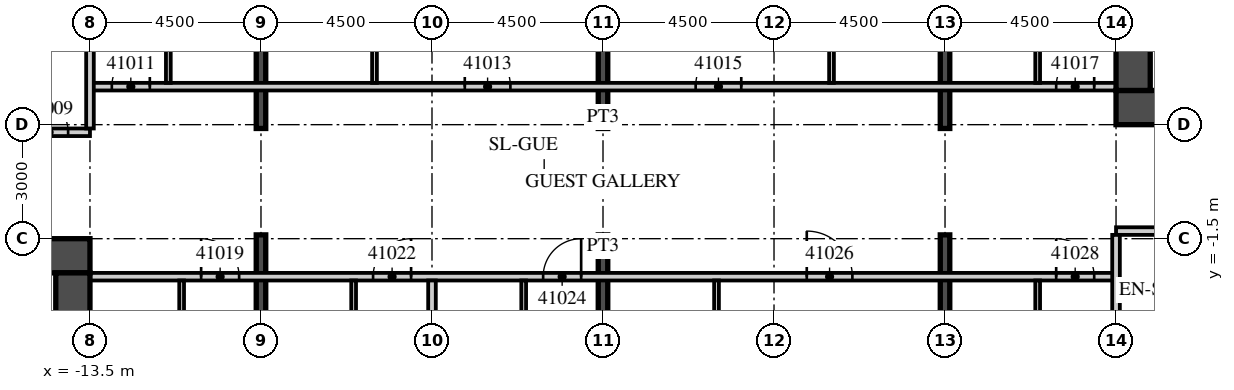
"""IFC4 building model, lengths in metres.
Left out: names, types, materials, properties, quantities, classifications, styles, units other than length and angle.
Written with IfcOpenShell. Run it as: python <this file> out.ifc"""

import sys

from ifc_helpers import new_model, si_unit, direction, frame, frame_2d, origin, place, context, subcontext, project, spatial, rectangle, extrude, element, fill, save


model = new_model("IFC4")
c1 = context("Model", 3, precision=1e-05, world=origin(), true_north=direction((0.0, 1.0)))
c2 = subcontext(c1, "Body", "Model", "MODEL_VIEW")
j1 = project(units=[si_unit("LENGTHUNIT", "METRE"), si_unit("PLANEANGLEUNIT", "RADIAN")], contexts=[c1])
p1 = place(None, origin())
s1 = spatial("IfcSite", under=j1, at=p1, CompositionType="ELEMENT")
p2 = place(p1, origin())
s2 = spatial("IfcBuilding", under=s1, at=p2, CompositionType="ELEMENT")
p3 = place(p2, frame((0.0, 0.0, 176.8)))
s3 = spatial("IfcBuildingStorey", under=s2, at=p3, CompositionType="ELEMENT", Elevation=176.8)
p4 = place(p3, frame((-9.0, -21.845, 0.0), z_axis=(0.0, 0.0, 1.0), x_axis=(0.0, 1.0, 0.0)))
e1 = element("IfcWall", 1, at=p4, inside=s3, PredefinedType="SHEAR", context=c2, shape_type="SweptSolid", body=[
    extrude(rectangle(XDim=20.445, YDim=0.25, at=frame_2d((10.223, 0.0))), origin(), (0.0, 0.0, 1.0), 3.3),
])
p5 = place(p3, frame((-9.0, 1.4, 0.0), z_axis=(0.0, 0.0, 1.0), x_axis=(0.0, 1.0, 0.0)))
e2 = element("IfcWall", 2, at=p5, inside=s3, PredefinedType="SHEAR", context=c2, shape_type="SweptSolid", body=[
    extrude(rectangle(XDim=18.001, YDim=0.25, at=frame_2d((9.0, 0.0))), origin(), (0.0, 0.0, 1.0), 3.3),
])
p6 = place(p3, frame((0.0, -20.979, 0.0), z_axis=(0.0, 0.0, 1.0), x_axis=(0.0, 1.0, 0.0)))
e3 = element("IfcWall", 3, at=p6, inside=s3, PredefinedType="SHEAR", context=c2, shape_type="SweptSolid", body=[
    extrude(rectangle(XDim=19.579, YDim=0.25, at=frame_2d((9.789, 0.0))), origin(), (0.0, 0.0, 1.0), 3.3),
])
p7 = place(p3, frame((0.0, 1.4, 0.0), z_axis=(0.0, 0.0, 1.0), x_axis=(0.0, 1.0, 0.0)))
e4 = element("IfcWall", 4, at=p7, inside=s3, PredefinedType="SHEAR", context=c2, shape_type="SweptSolid", body=[
    extrude(rectangle(XDim=18.867, YDim=0.25, at=frame_2d((9.434, 0.0))), origin(), (0.0, 0.0, 1.0), 3.3),
])
p8 = place(p3, frame((9.0, -20.112, 0.0), z_axis=(0.0, 0.0, 1.0), x_axis=(0.0, 1.0, 0.0)))
e5 = element("IfcWall", 5, at=p8, inside=s3, PredefinedType="SHEAR", context=c2, shape_type="SweptSolid", body=[
    extrude(rectangle(XDim=18.712, YDim=0.25, at=frame_2d((9.356, 0.0))), origin(), (0.0, 0.0, 1.0), 3.3),
])
p9 = place(p3, frame((9.0, 1.4, 0.0), z_axis=(0.0, 0.0, 1.0), x_axis=(0.0, 1.0, 0.0)))
e6 = element("IfcWall", 6, at=p9, inside=s3, PredefinedType="SHEAR", context=c2, shape_type="SweptSolid", body=[
    extrude(rectangle(XDim=19.734, YDim=0.25, at=frame_2d((9.867, 0.0))), origin(), (0.0, 0.0, 1.0), 3.3),
])
p10 = place(p3, frame((-42.913, 1.3, 0.0), z_axis=(0.0, 0.0, 1.0), x_axis=(1.0, 0.0, 0.0)))
e7 = element("IfcWall", 7, at=p10, inside=s3, PredefinedType="PARTITIONING", context=c2, shape_type="SweptSolid", body=[
    extrude(rectangle(XDim=29.413, YDim=0.2, at=frame_2d((14.707, 0.0))), origin(), (0.0, 0.0, 1.0), 3.02),
])
p11 = place(p10, frame((1.406, 0.0, 0.0)))
e8 = element("IfcOpeningElement", 8, at=p11, cuts=e7, PredefinedType="OPENING", context=c2, shape_type="SweptSolid", body=[
    extrude(rectangle(XDim=1.2, YDim=2.1, at=frame_2d((0.6, 1.05))), frame((0.0, 0.11, 0.0), z_axis=(0.0, -1.0, 0.0), x_axis=(1.0, 0.0, 0.0)), (0.0, 0.0, 1.0), 0.22),
])
p12 = place(p10, frame((12.275, 0.0, 0.0)))
e9 = element("IfcOpeningElement", 9, at=p12, cuts=e7, PredefinedType="OPENING", context=c2, shape_type="SweptSolid", body=[
    extrude(rectangle(XDim=1.2, YDim=2.1, at=frame_2d((0.6, 1.05))), frame((0.0, 0.11, 0.0), z_axis=(0.0, -1.0, 0.0), x_axis=(1.0, 0.0, 0.0)), (0.0, 0.0, 1.0), 0.22),
])
p13 = place(p10, frame((18.863, 0.0, 0.0)))
e10 = element("IfcOpeningElement", 10, at=p13, cuts=e7, PredefinedType="OPENING", context=c2, shape_type="SweptSolid", body=[
    extrude(rectangle(XDim=1.0, YDim=2.1, at=frame_2d((0.5, 1.05))), frame((0.0, 0.11, 0.0), z_axis=(0.0, -1.0, 0.0), x_axis=(1.0, 0.0, 0.0)), (0.0, 0.0, 1.0), 0.22),
])
p14 = place(p10, frame((23.338, 0.0, 0.0)))
e11 = element("IfcOpeningElement", 11, at=p14, cuts=e7, PredefinedType="OPENING", context=c2, shape_type="SweptSolid", body=[
    extrude(rectangle(XDim=1.0, YDim=2.1, at=frame_2d((0.5, 1.05))), frame((0.0, 0.11, 0.0), z_axis=(0.0, -1.0, 0.0), x_axis=(1.0, 0.0, 0.0)), (0.0, 0.0, 1.0), 0.22),
])
p15 = place(p10, frame((27.838, 0.0, 0.0)))
e12 = element("IfcOpeningElement", 12, at=p15, cuts=e7, PredefinedType="OPENING", context=c2, shape_type="SweptSolid", body=[
    extrude(rectangle(XDim=1.0, YDim=2.1, at=frame_2d((0.5, 1.05))), frame((0.0, 0.11, 0.0), z_axis=(0.0, -1.0, 0.0), x_axis=(1.0, 0.0, 0.0)), (0.0, 0.0, 1.0), 0.22),
])
p16 = place(p3, frame((-13.5, 2.5, 0.0), z_axis=(0.0, 0.0, 1.0), x_axis=(1.0, 0.0, 0.0)))
e13 = element("IfcWall", 13, at=p16, inside=s3, PredefinedType="PARTITIONING", context=c2, shape_type="SweptSolid", body=[
    extrude(rectangle(XDim=27.0, YDim=0.2, at=frame_2d((13.5, 0.0))), origin(), (0.0, 0.0, 1.0), 3.02),
])
p17 = place(p16, frame((0.575, 0.0, 0.0)))
e14 = element("IfcOpeningElement", 14, at=p17, cuts=e13, PredefinedType="OPENING", context=c2, shape_type="SweptSolid", body=[
    extrude(rectangle(XDim=1.0, YDim=2.1, at=frame_2d((0.5, 1.05))), frame((0.0, 0.11, 0.0), z_axis=(0.0, -1.0, 0.0), x_axis=(1.0, 0.0, 0.0)), (0.0, 0.0, 1.0), 0.22),
])
p18 = place(p16, frame((9.863, 0.0, 0.0)))
e15 = element("IfcOpeningElement", 15, at=p18, cuts=e13, PredefinedType="OPENING", context=c2, shape_type="SweptSolid", body=[
    extrude(rectangle(XDim=1.2, YDim=2.1, at=frame_2d((0.6, 1.05))), frame((0.0, 0.11, 0.0), z_axis=(0.0, -1.0, 0.0), x_axis=(1.0, 0.0, 0.0)), (0.0, 0.0, 1.0), 0.22),
])
p19 = place(p16, frame((15.938, 0.0, 0.0)))
e16 = element("IfcOpeningElement", 16, at=p19, cuts=e13, PredefinedType="OPENING", context=c2, shape_type="SweptSolid", body=[
    extrude(rectangle(XDim=1.2, YDim=2.1, at=frame_2d((0.6, 1.05))), frame((0.0, 0.11, 0.0), z_axis=(0.0, -1.0, 0.0), x_axis=(1.0, 0.0, 0.0)), (0.0, 0.0, 1.0), 0.22),
])
p20 = place(p16, frame((25.425, 0.0, 0.0)))
e17 = element("IfcOpeningElement", 17, at=p20, cuts=e13, PredefinedType="OPENING", context=c2, shape_type="SweptSolid", body=[
    extrude(rectangle(XDim=1.0, YDim=2.1, at=frame_2d((0.5, 1.05))), frame((0.0, 0.11, 0.0), z_axis=(0.0, -1.0, 0.0), x_axis=(1.0, 0.0, 0.0)), (0.0, 0.0, 1.0), 0.22),
])
p21 = place(p3, frame((-13.5, 1.4, 0.0), z_axis=(0.0, 0.0, 1.0), x_axis=(0.0, 1.0, 0.0)))
e18 = element("IfcWall", 18, at=p21, inside=s3, PredefinedType="PARTITIONING", context=c2, shape_type="SweptSolid", body=[
    extrude(rectangle(XDim=17.59, YDim=0.2, at=frame_2d((8.795, 0.0))), origin(), (0.0, 0.0, 1.0), 3.02),
])
p22 = place(p3, frame((-11.438, 2.6, 0.0), z_axis=(0.0, 0.0, 1.0), x_axis=(0.0, 1.0, 0.0)))
e19 = element("IfcWall", 19, at=p22, inside=s3, PredefinedType="PARTITIONING", context=c2, shape_type="SweptSolid", body=[
    extrude(rectangle(XDim=5.225, YDim=0.125, at=frame_2d((2.612, 0.0))), origin(), (0.0, 0.0, 1.0), 3.02),
])
p23 = place(p22, frame((2.45, 0.0, 0.0)))
e20 = element("IfcOpeningElement", 20, at=p23, cuts=e19, PredefinedType="OPENING", context=c2, shape_type="SweptSolid", body=[
    extrude(rectangle(XDim=0.9, YDim=2.1, at=frame_2d((0.45, 1.05))), frame((0.0, 0.073, 0.0), z_axis=(0.0, -1.0, 0.0), x_axis=(1.0, 0.0, 0.0)), (0.0, 0.0, 1.0), 0.145),
])
p24 = place(p3, frame((-6.013, 2.6, 0.0), z_axis=(0.0, 0.0, 1.0), x_axis=(0.0, 1.0, 0.0)))
e21 = element("IfcWall", 21, at=p24, inside=s3, PredefinedType="PARTITIONING", context=c2, shape_type="SweptSolid", body=[
    extrude(rectangle(XDim=5.225, YDim=0.125, at=frame_2d((2.612, 0.0))), origin(), (0.0, 0.0, 1.0), 3.02),
])
p25 = place(p24, frame((2.45, 0.0, 0.0)))
e22 = element("IfcOpeningElement", 22, at=p25, cuts=e21, PredefinedType="OPENING", context=c2, shape_type="SweptSolid", body=[
    extrude(rectangle(XDim=0.9, YDim=2.1, at=frame_2d((0.45, 1.05))), frame((0.0, 0.073, 0.0), z_axis=(0.0, -1.0, 0.0), x_axis=(1.0, 0.0, 0.0)), (0.0, 0.0, 1.0), 0.145),
])
p26 = place(p3, frame((6.013, 2.6, 0.0), z_axis=(0.0, 0.0, 1.0), x_axis=(0.0, 1.0, 0.0)))
e23 = element("IfcWall", 23, at=p26, inside=s3, PredefinedType="PARTITIONING", context=c2, shape_type="SweptSolid", body=[
    extrude(rectangle(XDim=5.225, YDim=0.125, at=frame_2d((2.612, 0.0))), origin(), (0.0, 0.0, 1.0), 3.02),
])
p27 = place(p26, frame((2.45, 0.0, 0.0)))
e24 = element("IfcOpeningElement", 24, at=p27, cuts=e23, PredefinedType="OPENING", context=c2, shape_type="SweptSolid", body=[
    extrude(rectangle(XDim=0.9, YDim=2.1, at=frame_2d((0.45, 1.05))), frame((0.0, 0.073, 0.0), z_axis=(0.0, -1.0, 0.0), x_axis=(1.0, 0.0, 0.0)), (0.0, 0.0, 1.0), 0.145),
])
p28 = place(p3, frame((11.438, 2.6, 0.0), z_axis=(0.0, 0.0, 1.0), x_axis=(0.0, 1.0, 0.0)))
e25 = element("IfcWall", 25, at=p28, inside=s3, PredefinedType="PARTITIONING", context=c2, shape_type="SweptSolid", body=[
    extrude(rectangle(XDim=5.225, YDim=0.125, at=frame_2d((2.612, 0.0))), origin(), (0.0, 0.0, 1.0), 3.02),
])
p29 = place(p28, frame((2.45, 0.0, 0.0)))
e26 = element("IfcOpeningElement", 26, at=p29, cuts=e25, PredefinedType="OPENING", context=c2, shape_type="SweptSolid", body=[
    extrude(rectangle(XDim=0.9, YDim=2.1, at=frame_2d((0.45, 1.05))), frame((0.0, 0.073, 0.0), z_axis=(0.0, -1.0, 0.0), x_axis=(1.0, 0.0, 0.0)), (0.0, 0.0, 1.0), 0.145),
])
p30 = place(p3, frame((-13.5, -2.5, 0.0), z_axis=(0.0, 0.0, 1.0), x_axis=(1.0, 0.0, 0.0)))
e27 = element("IfcWall", 27, at=p30, inside=s3, PredefinedType="PARTITIONING", context=c2, shape_type="SweptSolid", body=[
    extrude(rectangle(XDim=27.0, YDim=0.2, at=frame_2d((13.5, 0.0))), origin(), (0.0, 0.0, 1.0), 3.02),
])
p31 = place(p30, frame((2.925, 0.0, 0.0)))
e28 = element("IfcOpeningElement", 28, at=p31, cuts=e27, PredefinedType="OPENING", context=c2, shape_type="SweptSolid", body=[
    extrude(rectangle(XDim=1.0, YDim=2.1, at=frame_2d((0.5, 1.05))), frame((0.0, 0.11, 0.0), z_axis=(0.0, -1.0, 0.0), x_axis=(1.0, 0.0, 0.0)), (0.0, 0.0, 1.0), 0.22),
])
p32 = place(p30, frame((7.45, 0.0, 0.0)))
e29 = element("IfcOpeningElement", 29, at=p32, cuts=e27, PredefinedType="OPENING", context=c2, shape_type="SweptSolid", body=[
    extrude(rectangle(XDim=1.0, YDim=2.1, at=frame_2d((0.5, 1.05))), frame((0.0, 0.11, 0.0), z_axis=(0.0, -1.0, 0.0), x_axis=(1.0, 0.0, 0.0)), (0.0, 0.0, 1.0), 0.22),
])
p33 = place(p30, frame((11.925, 0.0, 0.0)))
e30 = element("IfcOpeningElement", 30, at=p33, cuts=e27, PredefinedType="OPENING", context=c2, shape_type="SweptSolid", body=[
    extrude(rectangle(XDim=1.0, YDim=2.1, at=frame_2d((0.5, 1.05))), frame((0.0, 0.11, 0.0), z_axis=(0.0, -1.0, 0.0), x_axis=(1.0, 0.0, 0.0)), (0.0, 0.0, 1.0), 0.22),
])
p34 = place(p30, frame((18.862, 0.0, 0.0)))
e31 = element("IfcOpeningElement", 31, at=p34, cuts=e27, PredefinedType="OPENING", context=c2, shape_type="SweptSolid", body=[
    extrude(rectangle(XDim=1.2, YDim=2.1, at=frame_2d((0.6, 1.05))), frame((0.0, 0.11, 0.0), z_axis=(0.0, -1.0, 0.0), x_axis=(1.0, 0.0, 0.0)), (0.0, 0.0, 1.0), 0.22),
])
p35 = place(p30, frame((25.425, 0.0, 0.0)))
e32 = element("IfcOpeningElement", 32, at=p35, cuts=e27, PredefinedType="OPENING", context=c2, shape_type="SweptSolid", body=[
    extrude(rectangle(XDim=1.0, YDim=2.1, at=frame_2d((0.5, 1.05))), frame((0.0, 0.11, 0.0), z_axis=(0.0, -1.0, 0.0), x_axis=(1.0, 0.0, 0.0)), (0.0, 0.0, 1.0), 0.22),
])
p36 = place(p3, frame((13.5, -1.3, 0.0), z_axis=(0.0, 0.0, 1.0), x_axis=(1.0, 0.0, 0.0)))
e33 = element("IfcWall", 33, at=p36, inside=s3, PredefinedType="PARTITIONING", context=c2, shape_type="SweptSolid", body=[
    extrude(rectangle(XDim=26.317, YDim=0.2, at=frame_2d((13.158, 0.0))), origin(), (0.0, 0.0, 1.0), 3.02),
])
p37 = place(p36, frame((2.925, 0.0, 0.0)))
e34 = element("IfcOpeningElement", 34, at=p37, cuts=e33, PredefinedType="OPENING", context=c2, shape_type="SweptSolid", body=[
    extrude(rectangle(XDim=1.0, YDim=2.1, at=frame_2d((0.5, 1.05))), frame((0.0, 0.11, 0.0), z_axis=(0.0, -1.0, 0.0), x_axis=(1.0, 0.0, 0.0)), (0.0, 0.0, 1.0), 0.22),
])
p38 = place(p36, frame((9.862, 0.0, 0.0)))
e35 = element("IfcOpeningElement", 35, at=p38, cuts=e33, PredefinedType="OPENING", context=c2, shape_type="SweptSolid", body=[
    extrude(rectangle(XDim=1.2, YDim=2.1, at=frame_2d((0.6, 1.05))), frame((0.0, 0.11, 0.0), z_axis=(0.0, -1.0, 0.0), x_axis=(1.0, 0.0, 0.0)), (0.0, 0.0, 1.0), 0.22),
])
p39 = place(p36, frame((15.938, 0.0, 0.0)))
e36 = element("IfcOpeningElement", 36, at=p39, cuts=e33, PredefinedType="OPENING", context=c2, shape_type="SweptSolid", body=[
    extrude(rectangle(XDim=1.2, YDim=2.1, at=frame_2d((0.6, 1.05))), frame((0.0, 0.11, 0.0), z_axis=(0.0, -1.0, 0.0), x_axis=(1.0, 0.0, 0.0)), (0.0, 0.0, 1.0), 0.22),
])
p40 = place(p36, frame((25.208, 0.0, 0.0)))
e37 = element("IfcOpeningElement", 37, at=p40, cuts=e33, PredefinedType="OPENING", context=c2, shape_type="SweptSolid", body=[
    extrude(rectangle(XDim=0.9, YDim=2.1, at=frame_2d((0.45, 1.05))), frame((0.0, 0.11, 0.0), z_axis=(0.0, -1.0, 0.0), x_axis=(1.0, 0.0, 0.0)), (0.0, 0.0, 1.0), 0.22),
])
p41 = place(p3, frame((-11.088, -7.825, 0.0), z_axis=(0.0, 0.0, 1.0), x_axis=(0.0, 1.0, 0.0)))
e38 = element("IfcWall", 38, at=p41, inside=s3, PredefinedType="PARTITIONING", context=c2, shape_type="SweptSolid", body=[
    extrude(rectangle(XDim=5.225, YDim=0.125, at=frame_2d((2.612, 0.0))), origin(), (0.0, 0.0, 1.0), 3.02),
])
p42 = place(p41, frame((1.875, 0.0, 0.0)))
e39 = element("IfcOpeningElement", 39, at=p42, cuts=e38, PredefinedType="OPENING", context=c2, shape_type="SweptSolid", body=[
    extrude(rectangle(XDim=0.9, YDim=2.1, at=frame_2d((0.45, 1.05))), frame((0.0, 0.073, 0.0), z_axis=(0.0, -1.0, 0.0), x_axis=(1.0, 0.0, 0.0)), (0.0, 0.0, 1.0), 0.145),
])
p43 = place(p3, frame((-4.5, -21.434, 0.0), z_axis=(0.0, 0.0, 1.0), x_axis=(0.0, 1.0, 0.0)))
e40 = element("IfcWall", 40, at=p43, inside=s3, PredefinedType="PARTITIONING", context=c2, shape_type="SweptSolid", body=[
    extrude(rectangle(XDim=18.834, YDim=0.2, at=frame_2d((9.417, 0.0))), origin(), (0.0, 0.0, 1.0), 3.02),
])
p44 = place(p3, frame((-6.562, -7.825, 0.0), z_axis=(0.0, 0.0, 1.0), x_axis=(0.0, 1.0, 0.0)))
e41 = element("IfcWall", 41, at=p44, inside=s3, PredefinedType="PARTITIONING", context=c2, shape_type="SweptSolid", body=[
    extrude(rectangle(XDim=5.225, YDim=0.125, at=frame_2d((2.612, 0.0))), origin(), (0.0, 0.0, 1.0), 3.02),
])
p45 = place(p44, frame((1.875, 0.0, 0.0)))
e42 = element("IfcOpeningElement", 42, at=p45, cuts=e41, PredefinedType="OPENING", context=c2, shape_type="SweptSolid", body=[
    extrude(rectangle(XDim=0.9, YDim=2.1, at=frame_2d((0.45, 1.05))), frame((0.0, 0.073, 0.0), z_axis=(0.0, -1.0, 0.0), x_axis=(1.0, 0.0, 0.0)), (0.0, 0.0, 1.0), 0.145),
])
p46 = place(p3, frame((-2.087, -7.825, 0.0), z_axis=(0.0, 0.0, 1.0), x_axis=(0.0, 1.0, 0.0)))
e43 = element("IfcWall", 43, at=p46, inside=s3, PredefinedType="PARTITIONING", context=c2, shape_type="SweptSolid", body=[
    extrude(rectangle(XDim=5.225, YDim=0.125, at=frame_2d((2.612, 0.0))), origin(), (0.0, 0.0, 1.0), 3.02),
])
p47 = place(p46, frame((1.875, 0.0, 0.0)))
e44 = element("IfcOpeningElement", 44, at=p47, cuts=e43, PredefinedType="OPENING", context=c2, shape_type="SweptSolid", body=[
    extrude(rectangle(XDim=0.9, YDim=2.1, at=frame_2d((0.45, 1.05))), frame((0.0, 0.073, 0.0), z_axis=(0.0, -1.0, 0.0), x_axis=(1.0, 0.0, 0.0)), (0.0, 0.0, 1.0), 0.145),
])
p48 = place(p3, frame((2.987, -7.825, 0.0), z_axis=(0.0, 0.0, 1.0), x_axis=(0.0, 1.0, 0.0)))
e45 = element("IfcWall", 45, at=p48, inside=s3, PredefinedType="PARTITIONING", context=c2, shape_type="SweptSolid", body=[
    extrude(rectangle(XDim=5.225, YDim=0.125, at=frame_2d((2.612, 0.0))), origin(), (0.0, 0.0, 1.0), 3.02),
])
p49 = place(p48, frame((1.875, 0.0, 0.0)))
e46 = element("IfcOpeningElement", 46, at=p49, cuts=e45, PredefinedType="OPENING", context=c2, shape_type="SweptSolid", body=[
    extrude(rectangle(XDim=0.9, YDim=2.1, at=frame_2d((0.45, 1.05))), frame((0.0, 0.073, 0.0), z_axis=(0.0, -1.0, 0.0), x_axis=(1.0, 0.0, 0.0)), (0.0, 0.0, 1.0), 0.145),
])
p50 = place(p3, frame((13.5, -19.701, 0.0), z_axis=(0.0, 0.0, 1.0), x_axis=(0.0, 1.0, 0.0)))
e47 = element("IfcWall", 47, at=p50, inside=s3, PredefinedType="PARTITIONING", context=c2, shape_type="SweptSolid", body=[
    extrude(rectangle(XDim=18.301, YDim=0.2, at=frame_2d((9.15, 0.0))), origin(), (0.0, 0.0, 1.0), 3.02),
])
p51 = place(p3, frame((11.438, -7.825, 0.0), z_axis=(0.0, 0.0, 1.0), x_axis=(0.0, 1.0, 0.0)))
e48 = element("IfcWall", 48, at=p51, inside=s3, PredefinedType="PARTITIONING", context=c2, shape_type="SweptSolid", body=[
    extrude(rectangle(XDim=5.225, YDim=0.125, at=frame_2d((2.612, 0.0))), origin(), (0.0, 0.0, 1.0), 3.02),
])
p52 = place(p51, frame((1.875, 0.0, 0.0)))
e49 = element("IfcOpeningElement", 49, at=p52, cuts=e48, PredefinedType="OPENING", context=c2, shape_type="SweptSolid", body=[
    extrude(rectangle(XDim=0.9, YDim=2.1, at=frame_2d((0.45, 1.05))), frame((0.0, 0.073, 0.0), z_axis=(0.0, -1.0, 0.0), x_axis=(1.0, 0.0, 0.0)), (0.0, 0.0, 1.0), 0.145),
])
p53 = place(p3, frame((-31.5, -1.95, 0.0), z_axis=(0.0, 0.0, 1.0), x_axis=(1.0, 0.0, 0.0)))
e50 = element("IfcWall", 50, at=p53, inside=s3, PredefinedType="SHEAR", context=c2, shape_type="SweptSolid", body=[
    extrude(rectangle(XDim=18.0, YDim=0.9, at=frame_2d((9.0, 0.0))), origin(), (0.0, 0.0, 1.0), 3.02),
])
p54 = place(p53, frame((14.725, 0.0, 0.0)))
e51 = element("IfcOpeningElement", 51, at=p54, cuts=e50, PredefinedType="OPENING", context=c2, shape_type="SweptSolid", body=[
    extrude(rectangle(XDim=1.8, YDim=2.1, at=frame_2d((0.9, 1.05))), frame((0.0, 0.46, 0.0), z_axis=(0.0, -1.0, 0.0), x_axis=(1.0, 0.0, 0.0)), (0.0, 0.0, 1.0), 0.92),
])
p55 = place(p3, frame((-13.95, -14.6, 0.0), z_axis=(0.0, 0.0, 1.0), x_axis=(0.0, 1.0, 0.0)))
e52 = element("IfcWall", 52, at=p55, inside=s3, PredefinedType="SHEAR", context=c2, shape_type="SweptSolid", body=[
    extrude(rectangle(XDim=12.2, YDim=0.9, at=frame_2d((6.1, 0.0))), origin(), (0.0, 0.0, 1.0), 3.02),
])
p56 = place(p3, frame((13.5, 1.95, 0.0), z_axis=(0.0, 0.0, 1.0), x_axis=(1.0, 0.0, 0.0)))
e53 = element("IfcWall", 53, at=p56, inside=s3, PredefinedType="SHEAR", context=c2, shape_type="SweptSolid", body=[
    extrude(rectangle(XDim=18.0, YDim=0.9, at=frame_2d((9.0, 0.0))), origin(), (0.0, 0.0, 1.0), 3.02),
])
p57 = place(p56, frame((1.475, 0.0, 0.0)))
e54 = element("IfcOpeningElement", 54, at=p57, cuts=e53, PredefinedType="OPENING", context=c2, shape_type="SweptSolid", body=[
    extrude(rectangle(XDim=1.8, YDim=2.1, at=frame_2d((0.9, 1.05))), frame((0.0, 0.46, 0.0), z_axis=(0.0, -1.0, 0.0), x_axis=(1.0, 0.0, 0.0)), (0.0, 0.0, 1.0), 0.92),
])
p58 = place(p3, frame((13.95, 2.4, 0.0), z_axis=(0.0, 0.0, 1.0), x_axis=(0.0, 1.0, 0.0)))
e55 = element("IfcWall", 55, at=p58, inside=s3, PredefinedType="SHEAR", context=c2, shape_type="SweptSolid", body=[
    extrude(rectangle(XDim=12.2, YDim=0.9, at=frame_2d((6.1, 0.0))), origin(), (0.0, 0.0, 1.0), 3.02),
])
p59 = place(p15, origin())
e56 = element("IfcDoor", 56, at=p59, inside=s3, OperationType="SINGLE_SWING_LEFT", PredefinedType="DOOR", context=c2, shape_type="SweptSolid", body=[
    extrude(rectangle(XDim=1.0, YDim=2.1, at=frame_2d((0.5, 1.05))), frame((0.0, 0.025, 0.0), z_axis=(0.0, -1.0, 0.0), x_axis=(1.0, 0.0, 0.0)), (0.0, 0.0, 1.0), 0.05),
])
fill(e12, e56)
p60 = place(p17, origin())
e57 = element("IfcDoor", 57, at=p60, inside=s3, OperationType="SINGLE_SWING_RIGHT", PredefinedType="DOOR", context=c2, shape_type="SweptSolid", body=[
    extrude(rectangle(XDim=1.0, YDim=2.1, at=frame_2d((0.5, 1.05))), frame((0.0, 0.025, 0.0), z_axis=(0.0, -1.0, 0.0), x_axis=(1.0, 0.0, 0.0)), (0.0, 0.0, 1.0), 0.05),
])
fill(e14, e57)
p61 = place(p18, origin())
e58 = element("IfcDoor", 58, at=p61, inside=s3, OperationType="SINGLE_SWING_LEFT", PredefinedType="DOOR", context=c2, shape_type="SweptSolid", body=[
    extrude(rectangle(XDim=1.2, YDim=2.1, at=frame_2d((0.6, 1.05))), frame((0.0, 0.025, 0.0), z_axis=(0.0, -1.0, 0.0), x_axis=(1.0, 0.0, 0.0)), (0.0, 0.0, 1.0), 0.05),
])
fill(e15, e58)
p62 = place(p19, origin())
e59 = element("IfcDoor", 59, at=p62, inside=s3, OperationType="SINGLE_SWING_RIGHT", PredefinedType="DOOR", context=c2, shape_type="SweptSolid", body=[
    extrude(rectangle(XDim=1.2, YDim=2.1, at=frame_2d((0.6, 1.05))), frame((0.0, 0.025, 0.0), z_axis=(0.0, -1.0, 0.0), x_axis=(1.0, 0.0, 0.0)), (0.0, 0.0, 1.0), 0.05),
])
fill(e16, e59)
p63 = place(p20, origin())
e60 = element("IfcDoor", 60, at=p63, inside=s3, OperationType="SINGLE_SWING_RIGHT", PredefinedType="DOOR", context=c2, shape_type="SweptSolid", body=[
    extrude(rectangle(XDim=1.0, YDim=2.1, at=frame_2d((0.5, 1.05))), frame((0.0, 0.025, 0.0), z_axis=(0.0, -1.0, 0.0), x_axis=(1.0, 0.0, 0.0)), (0.0, 0.0, 1.0), 0.05),
])
fill(e17, e60)
p64 = place(p31, origin())
e61 = element("IfcDoor", 61, at=p64, inside=s3, OperationType="SINGLE_SWING_LEFT", PredefinedType="DOOR", context=c2, shape_type="SweptSolid", body=[
    extrude(rectangle(XDim=1.0, YDim=2.1, at=frame_2d((0.5, 1.05))), frame((0.0, 0.025, 0.0), z_axis=(0.0, -1.0, 0.0), x_axis=(1.0, 0.0, 0.0)), (0.0, 0.0, 1.0), 0.05),
])
fill(e28, e61)
p65 = place(p32, origin())
e62 = element("IfcDoor", 62, at=p65, inside=s3, OperationType="SINGLE_SWING_RIGHT", PredefinedType="DOOR", context=c2, shape_type="SweptSolid", body=[
    extrude(rectangle(XDim=1.0, YDim=2.1, at=frame_2d((0.5, 1.05))), frame((0.0, 0.025, 0.0), z_axis=(0.0, -1.0, 0.0), x_axis=(1.0, 0.0, 0.0)), (0.0, 0.0, 1.0), 0.05),
])
fill(e29, e62)
p66 = place(p33, origin())
e63 = element("IfcDoor", 63, at=p66, inside=s3, OperationType="SINGLE_SWING_RIGHT", PredefinedType="DOOR", context=c2, shape_type="SweptSolid", body=[
    extrude(rectangle(XDim=1.0, YDim=2.1, at=frame_2d((0.5, 1.05))), frame((0.0, 0.025, 0.0), z_axis=(0.0, -1.0, 0.0), x_axis=(1.0, 0.0, 0.0)), (0.0, 0.0, 1.0), 0.05),
])
fill(e30, e63)
p67 = place(p34, origin())
e64 = element("IfcDoor", 64, at=p67, inside=s3, OperationType="SINGLE_SWING_LEFT", PredefinedType="DOOR", context=c2, shape_type="SweptSolid", body=[
    extrude(rectangle(XDim=1.2, YDim=2.1, at=frame_2d((0.6, 1.05))), frame((0.0, 0.025, 0.0), z_axis=(0.0, -1.0, 0.0), x_axis=(1.0, 0.0, 0.0)), (0.0, 0.0, 1.0), 0.05),
])
fill(e31, e64)
p68 = place(p35, origin())
e65 = element("IfcDoor", 65, at=p68, inside=s3, OperationType="SINGLE_SWING_LEFT", PredefinedType="DOOR", context=c2, shape_type="SweptSolid", body=[
    extrude(rectangle(XDim=1.0, YDim=2.1, at=frame_2d((0.5, 1.05))), frame((0.0, 0.025, 0.0), z_axis=(0.0, -1.0, 0.0), x_axis=(1.0, 0.0, 0.0)), (0.0, 0.0, 1.0), 0.05),
])
fill(e32, e65)
save(model, sys.argv[1])
